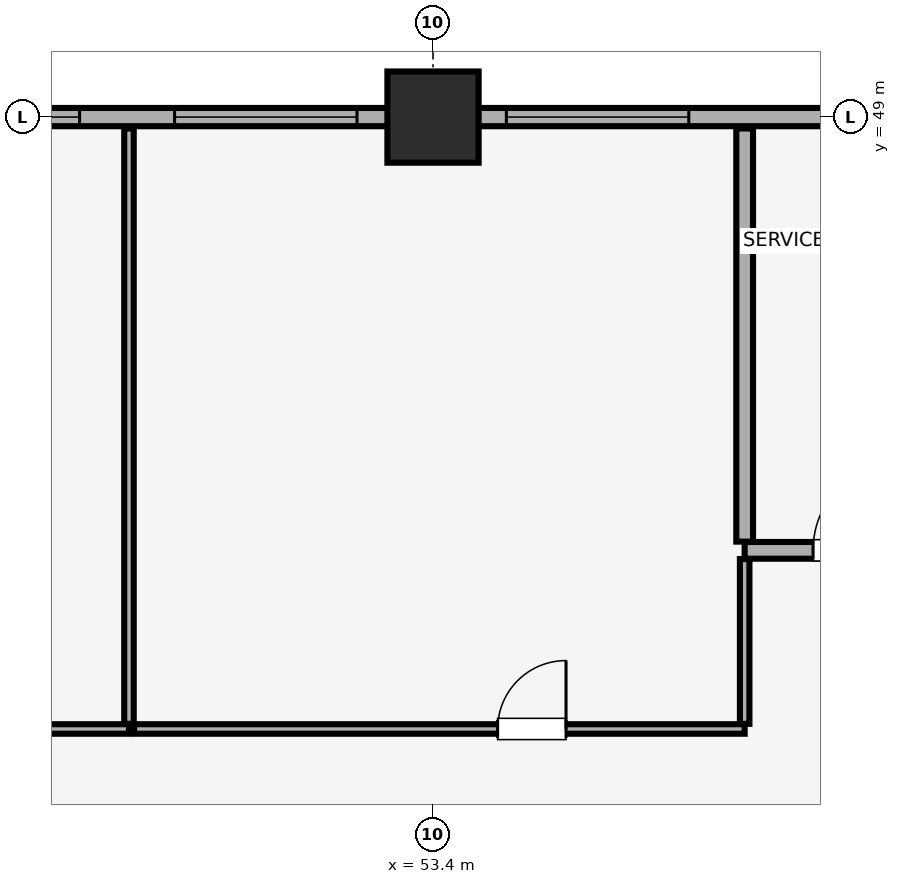
"""IFC4 building model, lengths in metres.
Left out: names, types, materials, properties, quantities, classifications, styles, units other than length and angle.
Written with IfcOpenShell. Run it as: python <this file> out.ifc"""

import sys

from ifc_helpers import new_model, si_unit, direction, frame, frame_2d, origin, origin_2d, place, context, subcontext, project, spatial, rectangle, extrude, element, fill, save


model = new_model("IFC4")
c1 = context("Model", 3, precision=1e-05, world=origin(), true_north=direction((0.0, 1.0)))
c2 = subcontext(c1, "Body", "Model", "MODEL_VIEW")
j1 = project(units=[si_unit("LENGTHUNIT", "METRE"), si_unit("PLANEANGLEUNIT", "RADIAN")], contexts=[c1])
p1 = place(None, origin())
s1 = spatial("IfcSite", under=j1, at=p1, CompositionType="ELEMENT")
p2 = place(p1, origin())
s2 = spatial("IfcBuilding", under=s1, at=p2, CompositionType="ELEMENT")
p3 = place(p2, frame((0.0, 0.0, 224.35)))
s3 = spatial("IfcBuildingStorey", under=s2, at=p3, CompositionType="ELEMENT", Elevation=224.35)
p4 = place(p3, frame((53.4, 49.0, 0.0), z_axis=(0.0, 0.0, 1.0), x_axis=(1.0, 0.0, 0.0)))
e1 = element("IfcColumn", 1, at=p4, inside=s3, PredefinedType="COLUMN", context=c2, shape_type="SweptSolid", body=[
    extrude(rectangle(XDim=1.2, YDim=1.2, at=origin_2d()), origin(), (0.0, 0.0, 1.0), 4.56),
])
p5 = place(p3, frame((77.0, 49.0, 0.0), z_axis=(0.0, 0.0, 1.0), x_axis=(-1.0, 0.0, 0.0)))
e2 = element("IfcWall", 2, at=p5, inside=s3, PredefinedType="SOLIDWALL", context=c2, shape_type="SweptSolid", body=[
    extrude(rectangle(XDim=70.0, YDim=0.24, at=frame_2d((35.0, 0.0))), origin(), (0.0, 0.0, 1.0), 3.4),
])
p6 = place(p5, frame((62.975, 0.0, 0.85)))
e3 = element("IfcOpeningElement", 3, at=p6, cuts=e2, PredefinedType="OPENING", context=c2, shape_type="SweptSolid", body=[
    extrude(rectangle(XDim=3.0, YDim=1.5, at=frame_2d((1.5, 0.75))), frame((0.0, 0.13, 0.0), z_axis=(0.0, -1.0, 0.0), x_axis=(1.0, 0.0, 0.0)), (0.0, 0.0, 1.0), 0.26),
])
p7 = place(p5, frame((4.025, 0.0, 0.85)))
e4 = element("IfcOpeningElement", 4, at=p7, cuts=e2, PredefinedType="OPENING", context=c2, shape_type="SweptSolid", body=[
    extrude(rectangle(XDim=3.0, YDim=1.5, at=frame_2d((1.5, 0.75))), frame((0.0, 0.13, 0.0), z_axis=(0.0, -1.0, 0.0), x_axis=(1.0, 0.0, 0.0)), (0.0, 0.0, 1.0), 0.26),
])
p8 = place(p5, frame((49.465, 0.0, 0.9)))
e5 = element("IfcOpeningElement", 5, at=p8, cuts=e2, PredefinedType="OPENING", context=c2, shape_type="SweptSolid", body=[
    extrude(rectangle(XDim=1.5, YDim=1.4, at=frame_2d((0.75, 0.7))), frame((0.0, 0.13, 0.0), z_axis=(0.0, -1.0, 0.0), x_axis=(1.0, 0.0, 0.0)), (0.0, 0.0, 1.0), 0.26),
])
p9 = place(p5, frame((41.65, 0.0, 0.9)))
e6 = element("IfcOpeningElement", 6, at=p9, cuts=e2, PredefinedType="OPENING", context=c2, shape_type="SweptSolid", body=[
    extrude(rectangle(XDim=3.6, YDim=1.5, at=frame_2d((1.8, 0.75))), frame((0.0, 0.13, 0.0), z_axis=(0.0, -1.0, 0.0), x_axis=(1.0, 0.0, 0.0)), (0.0, 0.0, 1.0), 0.26),
])
p10 = place(p5, frame((28.25, 0.0, 0.9)))
e7 = element("IfcOpeningElement", 7, at=p10, cuts=e2, PredefinedType="OPENING", context=c2, shape_type="SweptSolid", body=[
    extrude(rectangle(XDim=1.5, YDim=1.4, at=frame_2d((0.75, 0.7))), frame((0.0, 0.13, 0.0), z_axis=(0.0, -1.0, 0.0), x_axis=(1.0, 0.0, 0.0)), (0.0, 0.0, 1.0), 0.26),
])
p11 = place(p5, frame((24.6, 0.0, 0.9)))
e8 = element("IfcOpeningElement", 8, at=p11, cuts=e2, PredefinedType="OPENING", context=c2, shape_type="SweptSolid", body=[
    extrude(rectangle(XDim=2.4, YDim=1.5, at=frame_2d((1.2, 0.75))), frame((0.0, 0.13, 0.0), z_axis=(0.0, -1.0, 0.0), x_axis=(1.0, 0.0, 0.0)), (0.0, 0.0, 1.0), 0.26),
])
p12 = place(p5, frame((20.235, 0.0, 0.9)))
e9 = element("IfcOpeningElement", 9, at=p12, cuts=e2, PredefinedType="OPENING", context=c2, shape_type="SweptSolid", body=[
    extrude(rectangle(XDim=2.4, YDim=1.5, at=frame_2d((1.2, 0.75))), frame((0.0, 0.13, 0.0), z_axis=(0.0, -1.0, 0.0), x_axis=(1.0, 0.0, 0.0)), (0.0, 0.0, 1.0), 0.26),
])
p13 = place(p3, frame((57.5, 43.3, 0.0), z_axis=(0.0, 0.0, 1.0), x_axis=(1.0, 0.0, 0.0)))
e10 = element("IfcWall", 10, at=p13, inside=s3, PredefinedType="PARTITIONING", context=c2, shape_type="SweptSolid", body=[
    extrude(rectangle(XDim=3.04, YDim=0.22, at=frame_2d((1.52, 0.0))), origin(), (0.0, 0.0, 1.0), 4.52),
])
p14 = place(p13, frame((0.9, 0.0, 0.0)))
e11 = element("IfcOpeningElement", 11, at=p14, cuts=e10, PredefinedType="OPENING", context=c2, shape_type="SweptSolid", body=[
    extrude(rectangle(XDim=1.2, YDim=2.15, at=frame_2d((0.6, 1.075))), frame((0.0, 0.12, 0.0), z_axis=(0.0, -1.0, 0.0), x_axis=(1.0, 0.0, 0.0)), (0.0, 0.0, 1.0), 0.24),
])
p15 = place(p3, frame((57.5, 43.415, 0.0), z_axis=(0.0, 0.0, 1.0), x_axis=(0.0, 1.0, 0.0)))
e12 = element("IfcWall", 12, at=p15, inside=s3, PredefinedType="PARTITIONING", context=c2, shape_type="SweptSolid", body=[
    extrude(rectangle(XDim=5.435, YDim=0.22, at=frame_2d((2.718, 0.0))), origin(), (0.0, 0.0, 1.0), 4.52),
])
p16 = place(p3, frame((44.3, 40.95, 0.0), z_axis=(0.0, 0.0, 1.0), x_axis=(1.0, 0.0, 0.0)))
e13 = element("IfcWall", 13, at=p16, inside=s3, PredefinedType="PARTITIONING", context=c2, shape_type="SweptSolid", body=[
    extrude(rectangle(XDim=5.1, YDim=0.125, at=frame_2d((2.55, 0.0))), origin(), (0.0, 0.0, 1.0), 4.52),
])
p17 = place(p16, frame((2.85, 0.0, 0.0)))
e14 = element("IfcOpeningElement", 14, at=p17, cuts=e13, PredefinedType="OPENING", context=c2, shape_type="SweptSolid", body=[
    extrude(rectangle(XDim=0.9, YDim=2.1, at=frame_2d((0.45, 1.05))), frame((0.0, 0.073, 0.0), z_axis=(0.0, -1.0, 0.0), x_axis=(1.0, 0.0, 0.0)), (0.0, 0.0, 1.0), 0.145),
])
p18 = place(p3, frame((49.4, 41.018, 0.0), z_axis=(0.0, 0.0, 1.0), x_axis=(0.0, 1.0, 0.0)))
e15 = element("IfcWall", 15, at=p18, inside=s3, PredefinedType="PARTITIONING", context=c2, shape_type="SweptSolid", body=[
    extrude(rectangle(XDim=7.833, YDim=0.125, at=frame_2d((3.916, 0.0))), origin(), (0.0, 0.0, 1.0), 4.52),
])
p19 = place(p3, frame((49.468, 40.95, 0.0), z_axis=(0.0, 0.0, 1.0), x_axis=(1.0, 0.0, 0.0)))
e16 = element("IfcWall", 16, at=p19, inside=s3, PredefinedType="PARTITIONING", context=c2, shape_type="SweptSolid", body=[
    extrude(rectangle(XDim=8.032, YDim=0.125, at=frame_2d((4.016, 0.0))), origin(), (0.0, 0.0, 1.0), 4.52),
])
p20 = place(p19, frame((4.782, 0.0, 0.0)))
e17 = element("IfcOpeningElement", 17, at=p20, cuts=e16, PredefinedType="OPENING", context=c2, shape_type="SweptSolid", body=[
    extrude(rectangle(XDim=0.9, YDim=2.1, at=frame_2d((0.45, 1.05))), frame((0.0, 0.073, 0.0), z_axis=(0.0, -1.0, 0.0), x_axis=(1.0, 0.0, 0.0)), (0.0, 0.0, 1.0), 0.145),
])
p21 = place(p3, frame((57.5, 41.018, 0.0), z_axis=(0.0, 0.0, 1.0), x_axis=(0.0, 1.0, 0.0)))
e18 = element("IfcWall", 18, at=p21, inside=s3, PredefinedType="PARTITIONING", context=c2, shape_type="SweptSolid", body=[
    extrude(rectangle(XDim=2.167, YDim=0.125, at=frame_2d((1.084, 0.0))), origin(), (0.0, 0.0, 1.0), 4.52),
])
p22 = place(p10, origin())
e19 = element("IfcWindow", 19, at=p22, inside=s3, PartitioningType="SINGLE_PANEL", PredefinedType="WINDOW", context=c2, shape_type="SweptSolid", body=[
    extrude(rectangle(XDim=1.5, YDim=1.4, at=frame_2d((0.75, 0.7))), frame((0.0, 0.03, 0.0), z_axis=(0.0, -1.0, 0.0), x_axis=(1.0, 0.0, 0.0)), (0.0, 0.0, 1.0), 0.06),
])
fill(e7, e19)
p23 = place(p11, origin())
e20 = element("IfcWindow", 20, at=p23, inside=s3, PartitioningType="SINGLE_PANEL", PredefinedType="WINDOW", context=c2, shape_type="SweptSolid", body=[
    extrude(rectangle(XDim=2.4, YDim=1.5, at=frame_2d((1.2, 0.75))), frame((0.0, 0.03, 0.0), z_axis=(0.0, -1.0, 0.0), x_axis=(1.0, 0.0, 0.0)), (0.0, 0.0, 1.0), 0.06),
])
fill(e8, e20)
p24 = place(p12, origin())
e21 = element("IfcWindow", 21, at=p24, inside=s3, PartitioningType="SINGLE_PANEL", PredefinedType="WINDOW", context=c2, shape_type="SweptSolid", body=[
    extrude(rectangle(XDim=2.4, YDim=1.5, at=frame_2d((1.2, 0.75))), frame((0.0, 0.03, 0.0), z_axis=(0.0, -1.0, 0.0), x_axis=(1.0, 0.0, 0.0)), (0.0, 0.0, 1.0), 0.06),
])
fill(e9, e21)
p25 = place(p14, origin())
e22 = element("IfcDoor", 22, at=p25, inside=s3, OperationType="SINGLE_SWING_RIGHT", PredefinedType="DOOR", context=c2, shape_type="SweptSolid", body=[
    extrude(rectangle(XDim=1.2, YDim=2.15, at=frame_2d((0.6, 1.075))), frame((0.0, 0.025, 0.0), z_axis=(0.0, -1.0, 0.0), x_axis=(1.0, 0.0, 0.0)), (0.0, 0.0, 1.0), 0.05),
])
fill(e11, e22)
p26 = place(p20, origin())
e23 = element("IfcDoor", 23, at=p26, inside=s3, OperationType="SINGLE_SWING_RIGHT", PredefinedType="DOOR", context=c2, shape_type="SweptSolid", body=[
    extrude(rectangle(XDim=0.9, YDim=2.1, at=frame_2d((0.45, 1.05))), frame((0.0, 0.025, 0.0), z_axis=(0.0, -1.0, 0.0), x_axis=(1.0, 0.0, 0.0)), (0.0, 0.0, 1.0), 0.05),
])
fill(e17, e23)
save(model, sys.argv[1])
